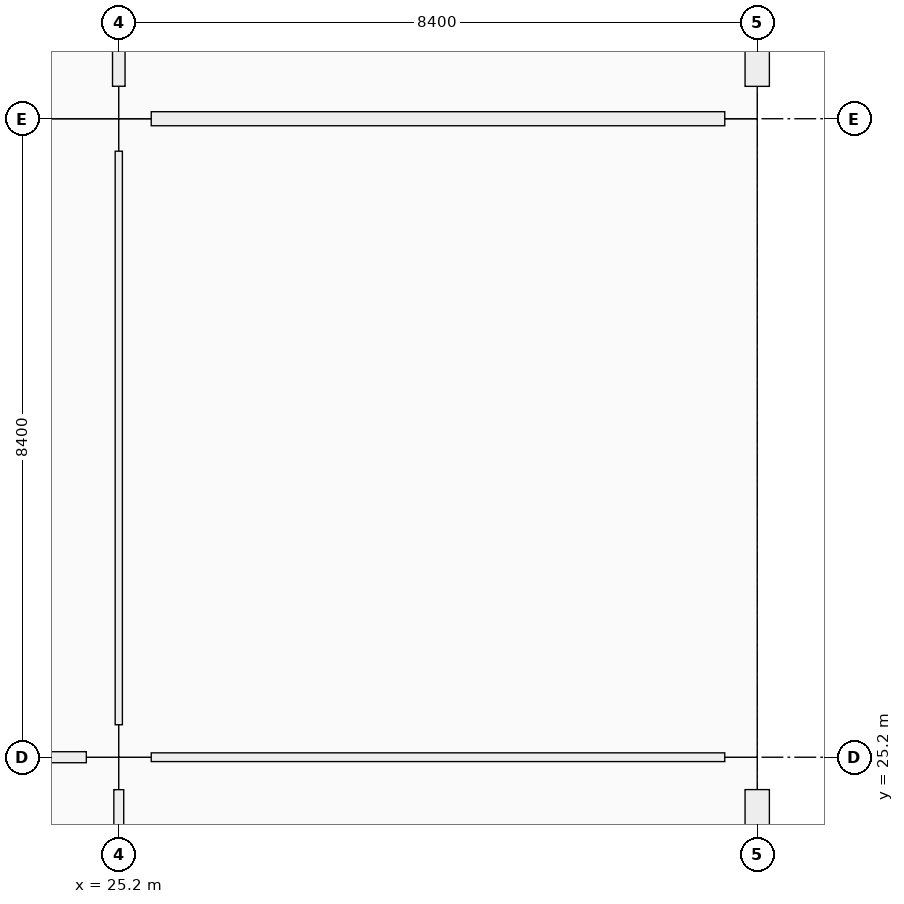
"""IFC4 building model, lengths in metres.
Left out: names, types, materials, properties, quantities, classifications, styles, units other than length and angle.
Written with IfcOpenShell. Run it as: python <this file> out.ifc"""

import sys

from ifc_helpers import new_model, si_unit, direction, frame, frame_2d, origin, origin_2d, place, context, subcontext, project, spatial, rectangle, extrude, element, fill, save


model = new_model("IFC4")
c1 = context("Model", 3, precision=1e-05, world=origin(), true_north=direction((0.0, 1.0)))
c2 = subcontext(c1, "Body", "Model", "MODEL_VIEW")
j1 = project(units=[si_unit("LENGTHUNIT", "METRE"), si_unit("PLANEANGLEUNIT", "RADIAN")], contexts=[c1])
p1 = place(None, origin())
s1 = spatial("IfcSite", under=j1, at=p1, CompositionType="ELEMENT")
p2 = place(p1, origin())
s2 = spatial("IfcBuilding", under=s1, at=p2, CompositionType="ELEMENT")
p3 = place(p2, origin())
s3 = spatial("IfcBuildingStorey", under=s2, at=p3, CompositionType="ELEMENT", Elevation=0.0)
for number, where, z_axis, x_axis in (
    (1, (25.2, 25.2, 0.0), (0.0, 0.0, 1.0), (1.0, 0.0, 0.0)),
    (2, (25.2, 33.6, 0.0), (0.0, 0.0, 1.0), (1.0, 0.0, 0.0)),
    (3, (33.6, 25.2, 0.0), (0.0, 0.0, 1.0), (1.0, 0.0, 0.0)),
    (4, (33.6, 33.6, 0.0), (0.0, 0.0, 1.0), (1.0, 0.0, 0.0)),
):
    element("IfcColumn", number, at=place(p3, frame(where, z_axis=z_axis, x_axis=x_axis)), inside=s3, PredefinedType="COLUMN", context=c2, shape_type="SweptSolid", body=[
        extrude(rectangle(XDim=0.85, YDim=0.85, at=origin_2d()), origin(), (0.0, 0.0, 1.0), 5.76),
    ])
p4 = place(p3, frame((33.6, 24.774, 0.0), z_axis=(0.0, 0.0, 1.0), x_axis=(0.0, -1.0, 0.0)))
e5 = element("IfcWall", 5, at=p4, inside=s3, PredefinedType="SOLIDWALL", context=c2, shape_type="SweptSolid", body=[
    extrude(rectangle(XDim=7.548, YDim=0.32, at=frame_2d((3.774, 0.0))), origin(), (0.0, 0.0, 1.0), 4.7),
])
p5 = place(p4, frame((2.674, 0.0, 0.9)))
e6 = element("IfcOpeningElement", 6, at=p5, cuts=e5, PredefinedType="OPENING", context=c2, shape_type="SweptSolid", body=[
    extrude(rectangle(XDim=2.2, YDim=1.35, at=frame_2d((1.1, 0.675))), frame((0.0, 0.16, 0.0), z_axis=(0.0, -1.0, 0.0), x_axis=(1.0, 0.0, 0.0)), (0.0, 0.0, 1.0), 0.32),
])
p6 = place(p3, frame((33.6, 41.574, 0.0), z_axis=(0.0, 0.0, 1.0), x_axis=(0.0, -1.0, 0.0)))
e7 = element("IfcWall", 7, at=p6, inside=s3, PredefinedType="SOLIDWALL", context=c2, shape_type="SweptSolid", body=[
    extrude(rectangle(XDim=7.548, YDim=0.32, at=frame_2d((3.774, 0.0))), origin(), (0.0, 0.0, 1.0), 4.7),
])
p7 = place(p6, frame((2.874, 0.0, 0.9)))
e8 = element("IfcOpeningElement", 8, at=p7, cuts=e7, PredefinedType="OPENING", context=c2, shape_type="SweptSolid", body=[
    extrude(rectangle(XDim=1.8, YDim=1.35, at=frame_2d((0.9, 0.675))), frame((0.0, 0.16, 0.0), z_axis=(0.0, -1.0, 0.0), x_axis=(1.0, 0.0, 0.0)), (0.0, 0.0, 1.0), 0.32),
])
p8 = place(p3, frame((17.227, 25.2, 0.0), z_axis=(0.0, 0.0, 1.0), x_axis=(1.0, 0.0, 0.0)))
e9 = element("IfcWall", 9, at=p8, inside=s3, PredefinedType="PARTITIONING", context=c2, shape_type="SweptSolid", body=[
    extrude(rectangle(XDim=7.546, YDim=0.145, at=frame_2d((3.773, 0.0))), origin(), (0.0, 0.0, 1.0), 3.66),
])
p9 = place(p8, frame((3.273, 0.0, 0.0)))
e10 = element("IfcOpeningElement", 10, at=p9, cuts=e9, PredefinedType="OPENING", context=c2, shape_type="SweptSolid", body=[
    extrude(rectangle(XDim=1.0, YDim=2.2, at=frame_2d((0.5, 1.1))), frame((0.0, 0.073, 0.0), z_axis=(0.0, -1.0, 0.0), x_axis=(1.0, 0.0, 0.0)), (0.0, 0.0, 1.0), 0.145),
])
p10 = place(p3, frame((25.627, 25.2, 0.0), z_axis=(0.0, 0.0, 1.0), x_axis=(1.0, 0.0, 0.0)))
e11 = element("IfcWall", 11, at=p10, inside=s3, PredefinedType="PARTITIONING", context=c2, shape_type="SweptSolid", body=[
    extrude(rectangle(XDim=7.546, YDim=0.115, at=frame_2d((3.773, 0.0))), origin(), (0.0, 0.0, 1.0), 3.66),
])
p11 = place(p10, frame((3.288, 0.0, 0.0)))
e12 = element("IfcOpeningElement", 12, at=p11, cuts=e11, PredefinedType="OPENING", context=c2, shape_type="SweptSolid", body=[
    extrude(rectangle(XDim=0.97, YDim=2.12, at=frame_2d((0.485, 1.06))), frame((0.0, 0.058, 0.0), z_axis=(0.0, -1.0, 0.0), x_axis=(1.0, 0.0, 0.0)), (0.0, 0.0, 1.0), 0.115),
])
p12 = place(p3, frame((25.627, 33.6, 0.0), z_axis=(0.0, 0.0, 1.0), x_axis=(1.0, 0.0, 0.0)))
e13 = element("IfcWall", 13, at=p12, inside=s3, PredefinedType="PARTITIONING", context=c2, shape_type="SweptSolid", body=[
    extrude(rectangle(XDim=7.546, YDim=0.185, at=frame_2d((3.773, 0.0))), origin(), (0.0, 0.0, 1.0), 3.66),
])
p13 = place(p12, frame((3.308, 0.0, 0.0)))
e14 = element("IfcOpeningElement", 14, at=p13, cuts=e13, PredefinedType="OPENING", context=c2, shape_type="SweptSolid", body=[
    extrude(rectangle(XDim=0.93, YDim=2.12, at=frame_2d((0.465, 1.06))), frame((0.0, 0.093, 0.0), z_axis=(0.0, -1.0, 0.0), x_axis=(1.0, 0.0, 0.0)), (0.0, 0.0, 1.0), 0.185),
])
p14 = place(p3, frame((25.2, 17.227, 0.0), z_axis=(0.0, 0.0, 1.0), x_axis=(0.0, 1.0, 0.0)))
e15 = element("IfcWall", 15, at=p14, inside=s3, PredefinedType="MOVABLE", context=c2, shape_type="SweptSolid", body=[
    extrude(rectangle(XDim=7.546, YDim=0.13, at=frame_2d((3.773, 0.0))), origin(), (0.0, 0.0, 1.0), 3.66),
])
p15 = place(p14, frame((3.268, 0.0, 0.0)))
e16 = element("IfcOpeningElement", 16, at=p15, cuts=e15, PredefinedType="OPENING", context=c2, shape_type="SweptSolid", body=[
    extrude(rectangle(XDim=1.01, YDim=2.12, at=frame_2d((0.505, 1.06))), frame((0.0, 0.065, 0.0), z_axis=(0.0, -1.0, 0.0), x_axis=(1.0, 0.0, 0.0)), (0.0, 0.0, 1.0), 0.13),
])
p16 = place(p3, frame((25.2, 25.627, 0.0), z_axis=(0.0, 0.0, 1.0), x_axis=(0.0, 1.0, 0.0)))
e17 = element("IfcWall", 17, at=p16, inside=s3, PredefinedType="PARTITIONING", context=c2, shape_type="SweptSolid", body=[
    extrude(rectangle(XDim=7.546, YDim=0.095, at=frame_2d((3.773, 0.0))), origin(), (0.0, 0.0, 1.0), 3.66),
])
p17 = place(p16, frame((3.283, 0.0, 0.0)))
e18 = element("IfcOpeningElement", 18, at=p17, cuts=e17, PredefinedType="OPENING", context=c2, shape_type="SweptSolid", body=[
    extrude(rectangle(XDim=0.98, YDim=2.18, at=frame_2d((0.49, 1.09))), frame((0.0, 0.047, 0.0), z_axis=(0.0, -1.0, 0.0), x_axis=(1.0, 0.0, 0.0)), (0.0, 0.0, 1.0), 0.095),
])
p18 = place(p3, frame((25.2, 34.027, 0.0), z_axis=(0.0, 0.0, 1.0), x_axis=(0.0, 1.0, 0.0)))
e19 = element("IfcWall", 19, at=p18, inside=s3, PredefinedType="PARTITIONING", context=c2, shape_type="SweptSolid", body=[
    extrude(rectangle(XDim=7.546, YDim=0.165, at=frame_2d((3.773, 0.0))), origin(), (0.0, 0.0, 1.0), 3.66),
])
p19 = place(p18, frame((3.293, 0.0, 0.0)))
e20 = element("IfcOpeningElement", 20, at=p19, cuts=e19, PredefinedType="OPENING", context=c2, shape_type="SweptSolid", body=[
    extrude(rectangle(XDim=0.96, YDim=2.18, at=frame_2d((0.48, 1.09))), frame((0.0, 0.083, 0.0), z_axis=(0.0, -1.0, 0.0), x_axis=(1.0, 0.0, 0.0)), (0.0, 0.0, 1.0), 0.165),
])
p20 = place(p17, origin())
e21 = element("IfcDoor", 21, at=p20, inside=s3, OperationType="SINGLE_SWING_LEFT", PredefinedType="DOOR", context=c2, shape_type="SweptSolid", body=[
    extrude(rectangle(XDim=0.98, YDim=2.18, at=frame_2d((0.49, 1.09))), frame((0.0, 0.025, 0.0), z_axis=(0.0, -1.0, 0.0), x_axis=(1.0, 0.0, 0.0)), (0.0, 0.0, 1.0), 0.05),
])
fill(e18, e21)
p21 = place(p11, origin())
e22 = element("IfcDoor", 22, at=p21, inside=s3, OperationType="SINGLE_SWING_LEFT", PredefinedType="DOOR", context=c2, shape_type="SweptSolid", body=[
    extrude(rectangle(XDim=0.97, YDim=2.12, at=frame_2d((0.485, 1.06))), frame((0.0, 0.025, 0.0), z_axis=(0.0, -1.0, 0.0), x_axis=(1.0, 0.0, 0.0)), (0.0, 0.0, 1.0), 0.05),
])
fill(e12, e22)
p22 = place(p13, origin())
e23 = element("IfcDoor", 23, at=p22, inside=s3, OperationType="SINGLE_SWING_RIGHT", PredefinedType="DOOR", context=c2, shape_type="SweptSolid", body=[
    extrude(rectangle(XDim=0.93, YDim=2.12, at=frame_2d((0.465, 1.06))), frame((0.0, 0.025, 0.0), z_axis=(0.0, -1.0, 0.0), x_axis=(1.0, 0.0, 0.0)), (0.0, 0.0, 1.0), 0.05),
])
fill(e14, e23)
save(model, sys.argv[1])
